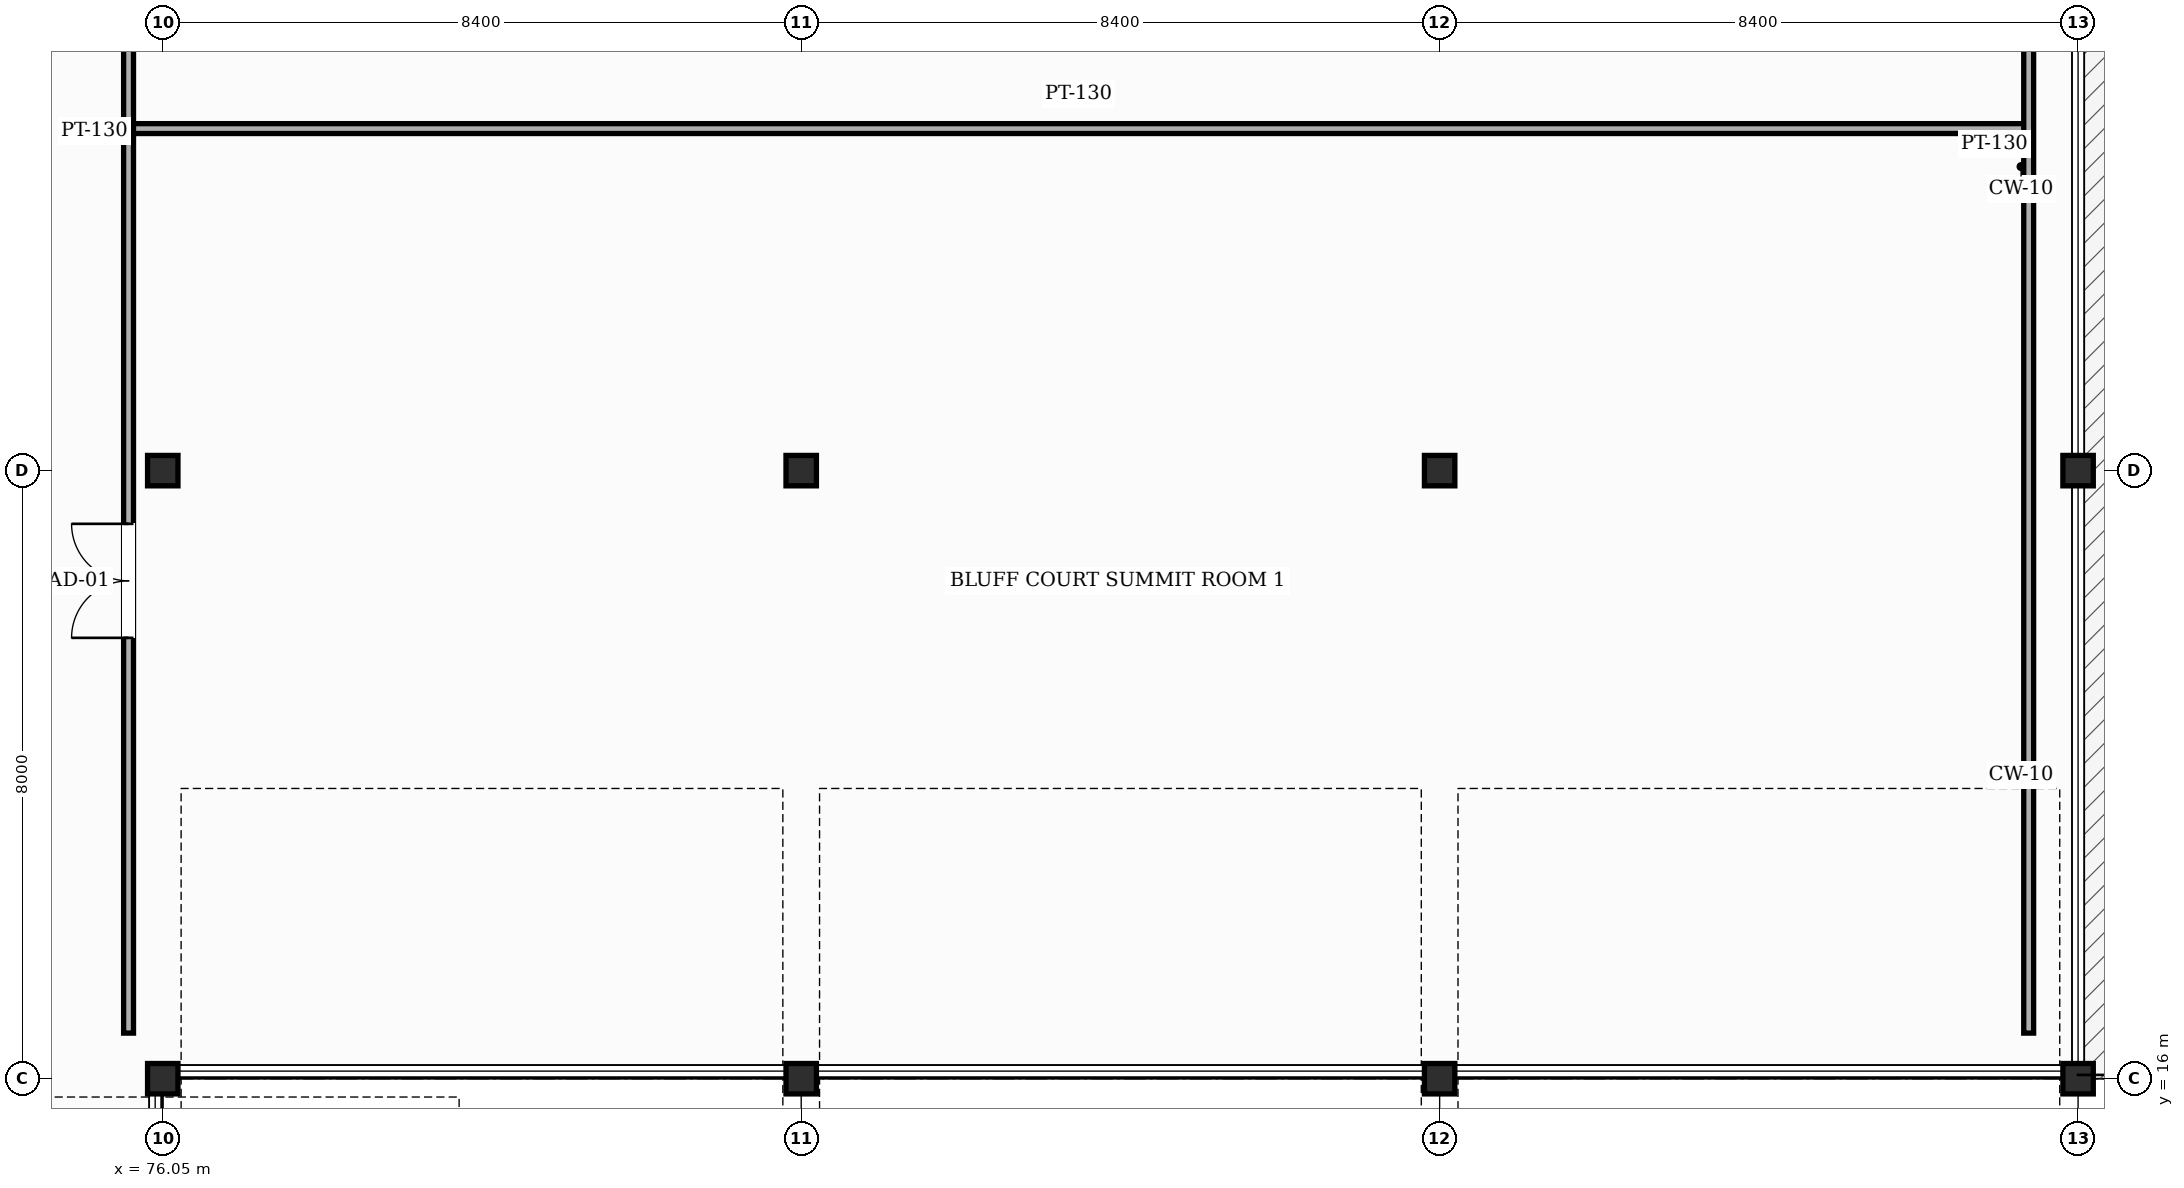
"""IFC4 building model, lengths in metres.
Left out: names, types, materials, properties, quantities, classifications, styles, units other than length and angle.
Written with IfcOpenShell. Run it as: python <this file> out.ifc"""

import sys

from ifc_helpers import new_model, si_unit, direction, frame, frame_2d, origin, origin_2d, place, context, subcontext, project, spatial, rectangle, i_section, extrude, element, fill, save


model = new_model("IFC4")
c1 = context("Model", 3, precision=1e-05, world=origin(), true_north=direction((0.0, 1.0)))
c2 = subcontext(c1, "Body", "Model", "MODEL_VIEW")
j1 = project(units=[si_unit("LENGTHUNIT", "METRE"), si_unit("PLANEANGLEUNIT", "RADIAN")], contexts=[c1])
p1 = place(None, origin())
s1 = spatial("IfcSite", under=j1, at=p1, CompositionType="ELEMENT")
p2 = place(p1, origin())
s2 = spatial("IfcBuilding", under=s1, at=p2, CompositionType="ELEMENT")
p3 = place(p2, frame((0.0, 0.0, 15.0)))
s3 = spatial("IfcBuildingStorey", under=s2, at=p3, CompositionType="ELEMENT", Elevation=15.0)
for number, where, z_axis, x_axis in (
    (1, (76.05, 16.0, 0.0), (0.0, 0.0, 1.0), (1.0, 0.0, 0.0)),
    (2, (76.05, 24.0, 0.0), (0.0, 0.0, 1.0), (1.0, 0.0, 0.0)),
    (3, (84.45, 16.0, 0.0), (0.0, 0.0, 1.0), (1.0, 0.0, 0.0)),
    (4, (84.45, 24.0, 0.0), (0.0, 0.0, 1.0), (1.0, 0.0, 0.0)),
):
    element("IfcColumn", number, at=place(p3, frame(where, z_axis=z_axis, x_axis=x_axis)), inside=s3, PredefinedType="COLUMN", context=c2, shape_type="SweptSolid", body=[
        extrude(i_section(OverallWidth=0.4, OverallDepth=0.4, WebThickness=0.013, FlangeThickness=0.021, FilletRadius=0.022, at=origin_2d()), origin(), (0.0, 0.0, 1.0), 4.8),
    ])
for number, where, z_axis, x_axis in (
    (5, (92.85, 16.0, 0.0), (0.0, 0.0, 1.0), (1.0, 0.0, 0.0)),
    (6, (92.85, 24.0, 0.0), (0.0, 0.0, 1.0), (1.0, 0.0, 0.0)),
    (7, (101.25, 16.0, 0.0), (0.0, 0.0, 1.0), (1.0, 0.0, 0.0)),
    (8, (101.25, 24.0, 0.0), (0.0, 0.0, 1.0), (1.0, 0.0, 0.0)),
):
    element("IfcColumn", number, at=place(p3, frame(where, z_axis=z_axis, x_axis=x_axis)), inside=s3, PredefinedType="COLUMN", context=c2, shape_type="SweptSolid", body=[
        extrude(i_section(OverallWidth=0.4, OverallDepth=0.4, WebThickness=0.013, FlangeThickness=0.021, FilletRadius=0.022, at=origin_2d()), origin(), (0.0, 0.0, 1.0), 4.56),
    ])
p4 = place(p3, frame((75.6, 28.5, 0.0), z_axis=(0.0, 0.0, 1.0), x_axis=(1.0, 0.0, 0.0)))
e9 = element("IfcWall", 9, at=p4, inside=s3, PredefinedType="PARTITIONING", context=c2, shape_type="SweptSolid", body=[
    extrude(rectangle(XDim=25.0, YDim=0.13, at=frame_2d((12.5, 0.0))), origin(), (0.0, 0.0, 1.0), 4.545),
])
p5 = place(p3, frame((75.6, 16.6, 0.0), z_axis=(0.0, 0.0, 1.0), x_axis=(0.0, 1.0, 0.0)))
e10 = element("IfcWall", 10, at=p5, inside=s3, PredefinedType="PARTITIONING", context=c2, shape_type="SweptSolid", body=[
    extrude(rectangle(XDim=35.7, YDim=0.13, at=frame_2d((17.85, 0.0))), origin(), (0.0, 0.0, 1.0), 4.545),
])
p6 = place(p5, frame((5.2, 0.0, 0.0)))
e11 = element("IfcOpeningElement", 11, at=p6, cuts=e10, PredefinedType="OPENING", context=c2, shape_type="SweptSolid", body=[
    extrude(rectangle(XDim=1.5, YDim=2.3, at=frame_2d((0.75, 1.15))), frame((0.0, 0.075, 0.0), z_axis=(0.0, -1.0, 0.0), x_axis=(1.0, 0.0, 0.0)), (0.0, 0.0, 1.0), 0.15),
])
p7 = place(p5, frame((17.025, 0.0, 0.0)))
e12 = element("IfcOpeningElement", 12, at=p7, cuts=e10, PredefinedType="OPENING", context=c2, shape_type="SweptSolid", body=[
    extrude(rectangle(XDim=1.65, YDim=2.35, at=frame_2d((0.825, 1.175))), frame((0.0, 0.075, 0.0), z_axis=(0.0, -1.0, 0.0), x_axis=(1.0, 0.0, 0.0)), (0.0, 0.0, 1.0), 0.15),
])
p8 = place(p5, frame((29.0, 0.0, 0.0)))
e13 = element("IfcOpeningElement", 13, at=p8, cuts=e10, PredefinedType="OPENING", context=c2, shape_type="SweptSolid", body=[
    extrude(rectangle(XDim=1.5, YDim=2.3, at=frame_2d((0.75, 1.15))), frame((0.0, 0.075, 0.0), z_axis=(0.0, -1.0, 0.0), x_axis=(1.0, 0.0, 0.0)), (0.0, 0.0, 1.0), 0.15),
])
p9 = place(p3, frame((100.6, 16.6, 0.0), z_axis=(0.0, 0.0, 1.0), x_axis=(0.0, 1.0, 0.0)))
e14 = element("IfcWall", 14, at=p9, inside=s3, PredefinedType="PARTITIONING", context=c2, shape_type="SweptSolid", body=[
    extrude(rectangle(XDim=35.7, YDim=0.13, at=frame_2d((17.85, 0.0))), origin(), (0.0, 0.0, 1.0), 4.545),
])
p10 = place(p6, origin())
e15 = element("IfcDoor", 15, at=p10, inside=s3, OperationType="DOUBLE_DOOR_SINGLE_SWING", PredefinedType="DOOR", context=c2, shape_type="SweptSolid", body=[
    extrude(rectangle(XDim=1.5, YDim=2.3, at=frame_2d((0.75, 1.15))), frame((0.0, 0.025, 0.0), z_axis=(0.0, -1.0, 0.0), x_axis=(1.0, 0.0, 0.0)), (0.0, 0.0, 1.0), 0.05),
])
fill(e11, e15)
save(model, sys.argv[1])
